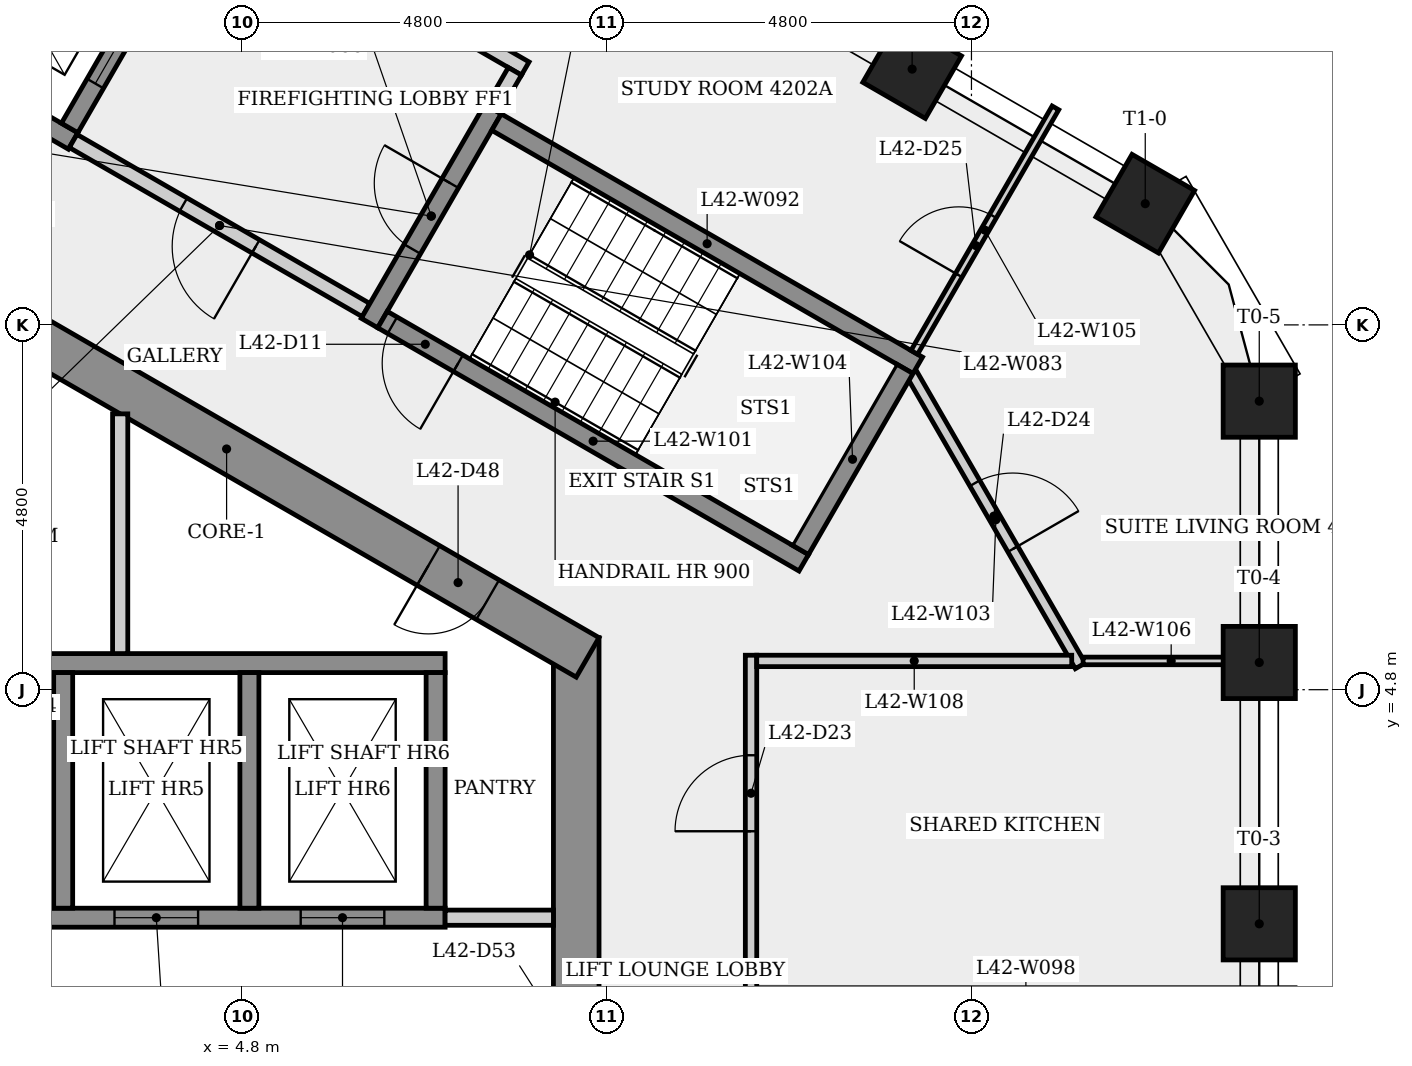
"""IFC4 building model, lengths in metres.
Left out: names, types, materials, properties, quantities, classifications, styles, units other than length and angle.
Written with IfcOpenShell. Run it as: python <this file> out.ifc"""

import sys

from ifc_helpers import new_model, si_unit, direction, frame, frame_2d, origin, origin_2d, place, context, subcontext, project, spatial, rectangle, extrude, element, fill, save


model = new_model("IFC4")
c1 = context("Model", 3, precision=1e-05, world=origin(), true_north=direction((0.0, 1.0)))
c2 = subcontext(c1, "Body", "Model", "MODEL_VIEW")
j1 = project(units=[si_unit("LENGTHUNIT", "METRE"), si_unit("PLANEANGLEUNIT", "RADIAN")], contexts=[c1])
p1 = place(None, origin())
s1 = spatial("IfcSite", under=j1, at=p1, CompositionType="ELEMENT")
p2 = place(p1, origin())
s2 = spatial("IfcBuilding", under=s1, at=p2, CompositionType="ELEMENT")
p3 = place(p2, frame((0.0, 0.0, 159.5)))
s3 = spatial("IfcBuildingStorey", under=s2, at=p3, CompositionType="ELEMENT", Elevation=159.5)
p4 = place(p3, frame((9.2, -5.485, 0.0), z_axis=(0.0, 0.0, 1.0), x_axis=(0.0, 1.0, 0.0)))
e1 = element("IfcWall", 1, at=p4, inside=s3, PredefinedType="SHEAR", context=c2, shape_type="SweptSolid", body=[
    extrude(rectangle(XDim=10.97, YDim=0.6, at=frame_2d((5.485, 0.0))), origin(), (0.0, 0.0, 1.0), 3.4),
])
p5 = place(p4, frame((4.685, 0.0, 0.0)))
e2 = element("IfcOpeningElement", 2, at=p5, cuts=e1, PredefinedType="OPENING", context=c2, shape_type="SweptSolid", body=[
    extrude(rectangle(XDim=1.6, YDim=2.1, at=frame_2d((0.8, 1.05))), frame((0.0, 0.31, 0.0), z_axis=(0.0, -1.0, 0.0), x_axis=(1.0, 0.0, 0.0)), (0.0, 0.0, 1.0), 0.62),
])
p6 = place(p3, frame((9.35, 5.225, 0.0), z_axis=(0.0, 0.0, 1.0), x_axis=(-0.866023993627, 0.500002442456, 0.0)))
e3 = element("IfcWall", 3, at=p6, inside=s3, PredefinedType="SHEAR", context=c2, shape_type="SweptSolid", body=[
    extrude(rectangle(XDim=10.97, YDim=0.6, at=frame_2d((5.485, 0.0))), origin(), (0.0, 0.0, 1.0), 3.4),
])
p7 = place(p6, frame((8.325, 0.0, 0.0)))
e4 = element("IfcOpeningElement", 4, at=p7, cuts=e3, PredefinedType="OPENING", context=c2, shape_type="SweptSolid", body=[
    extrude(rectangle(XDim=0.9, YDim=2.1, at=frame_2d((0.45, 1.05))), frame((0.0, 0.31, 0.0), z_axis=(0.0, -1.0, 0.0), x_axis=(1.0, 0.0, 0.0)), (0.0, 0.0, 1.0), 0.62),
])
p8 = place(p6, frame((1.518, 0.0, 0.0)))
e5 = element("IfcOpeningElement", 5, at=p8, cuts=e3, PredefinedType="OPENING", context=c2, shape_type="SweptSolid", body=[
    extrude(rectangle(XDim=0.9, YDim=2.1, at=frame_2d((0.45, 1.05))), frame((0.0, 0.31, 0.0), z_axis=(0.0, -1.0, 0.0), x_axis=(1.0, 0.0, 0.0)), (0.0, 0.0, 1.0), 0.62),
])
for number, where, z_axis, x_axis in (
    (6, (18.187, 1.719, 0.0), (0.0, 0.0, 1.0), (1.0, 0.0, 0.0)),
    (7, (18.187, 5.158, 0.0), (0.0, 0.0, 1.0), (1.0, 0.0, 0.0)),
    (8, (18.187, 8.597, 0.0), (0.0, 0.0, 1.0), (1.0, 0.0, 0.0)),
    (9, (16.687, 11.195, 0.0), (0.0, 0.0, 1.0), (0.5, 0.866, 0.0)),
    (10, (13.62, 12.965, 0.0), (0.0, 0.0, 1.0), (0.5, 0.866, 0.0)),
):
    element("IfcColumn", number, at=place(p3, frame(where, z_axis=z_axis, x_axis=x_axis)), inside=s3, PredefinedType="COLUMN", context=c2, shape_type="SweptSolid", body=[
        extrude(rectangle(XDim=0.95, YDim=0.95, at=origin_2d()), origin(), (0.0, 0.0, 1.0), 3.4),
    ])
p9 = place(p3, frame((-7.475, 1.8, 0.0), z_axis=(0.0, 0.0, 1.0), x_axis=(1.0, 0.0, 0.0)))
e11 = element("IfcWall", 11, at=p9, inside=s3, PredefinedType="SHEAR", context=c2, shape_type="SweptSolid", body=[
    extrude(rectangle(XDim=14.95, YDim=0.25, at=frame_2d((7.475, 0.0))), origin(), (0.0, 0.0, 1.0), 3.05),
])
p10 = place(p9, frame((0.8, 0.0, 0.0)))
e12 = element("IfcOpeningElement", 12, at=p10, cuts=e11, PredefinedType="OPENING", context=c2, shape_type="SweptSolid", body=[
    extrude(rectangle(XDim=1.1, YDim=2.1, at=frame_2d((0.55, 1.05))), frame((0.0, 0.135, 0.0), z_axis=(0.0, -1.0, 0.0), x_axis=(1.0, 0.0, 0.0)), (0.0, 0.0, 1.0), 0.27),
])
p11 = place(p9, frame((3.25, 0.0, 0.0)))
e13 = element("IfcOpeningElement", 13, at=p11, cuts=e11, PredefinedType="OPENING", context=c2, shape_type="SweptSolid", body=[
    extrude(rectangle(XDim=1.1, YDim=2.1, at=frame_2d((0.55, 1.05))), frame((0.0, 0.135, 0.0), z_axis=(0.0, -1.0, 0.0), x_axis=(1.0, 0.0, 0.0)), (0.0, 0.0, 1.0), 0.27),
])
p12 = place(p9, frame((5.7, 0.0, 0.0)))
e14 = element("IfcOpeningElement", 14, at=p12, cuts=e11, PredefinedType="OPENING", context=c2, shape_type="SweptSolid", body=[
    extrude(rectangle(XDim=1.1, YDim=2.1, at=frame_2d((0.55, 1.05))), frame((0.0, 0.135, 0.0), z_axis=(0.0, -1.0, 0.0), x_axis=(1.0, 0.0, 0.0)), (0.0, 0.0, 1.0), 0.27),
])
p13 = place(p9, frame((8.15, 0.0, 0.0)))
e15 = element("IfcOpeningElement", 15, at=p13, cuts=e11, PredefinedType="OPENING", context=c2, shape_type="SweptSolid", body=[
    extrude(rectangle(XDim=1.1, YDim=2.1, at=frame_2d((0.55, 1.05))), frame((0.0, 0.135, 0.0), z_axis=(0.0, -1.0, 0.0), x_axis=(1.0, 0.0, 0.0)), (0.0, 0.0, 1.0), 0.27),
])
p14 = place(p9, frame((10.6, 0.0, 0.0)))
e16 = element("IfcOpeningElement", 16, at=p14, cuts=e11, PredefinedType="OPENING", context=c2, shape_type="SweptSolid", body=[
    extrude(rectangle(XDim=1.1, YDim=2.1, at=frame_2d((0.55, 1.05))), frame((0.0, 0.135, 0.0), z_axis=(0.0, -1.0, 0.0), x_axis=(1.0, 0.0, 0.0)), (0.0, 0.0, 1.0), 0.27),
])
p15 = place(p9, frame((13.05, 0.0, 0.0)))
e17 = element("IfcOpeningElement", 17, at=p15, cuts=e11, PredefinedType="OPENING", context=c2, shape_type="SweptSolid", body=[
    extrude(rectangle(XDim=1.1, YDim=2.1, at=frame_2d((0.55, 1.05))), frame((0.0, 0.135, 0.0), z_axis=(0.0, -1.0, 0.0), x_axis=(1.0, 0.0, 0.0)), (0.0, 0.0, 1.0), 0.27),
])
p16 = place(p3, frame((-7.225, 5.15, 0.0), z_axis=(0.0, 0.0, 1.0), x_axis=(1.0, 0.0, 0.0)))
e18 = element("IfcWall", 18, at=p16, inside=s3, PredefinedType="SHEAR", context=c2, shape_type="SweptSolid", body=[
    extrude(rectangle(XDim=14.7, YDim=0.25, at=frame_2d((7.35, 0.0))), origin(), (0.0, 0.0, 1.0), 3.05),
])
p17 = place(p3, frame((2.45, 5.025, 0.0), z_axis=(0.0, 0.0, 1.0), x_axis=(0.0, -1.0, 0.0)))
e19 = element("IfcWall", 19, at=p17, inside=s3, PredefinedType="SHEAR", context=c2, shape_type="SweptSolid", body=[
    extrude(rectangle(XDim=3.1, YDim=0.25, at=frame_2d((1.55, 0.0))), origin(), (0.0, 0.0, 1.0), 3.4),
])
p18 = place(p3, frame((2.581, 12.02, 0.0), z_axis=(0.0, 0.0, 1.0), x_axis=(-0.866040211805, 0.499974350878, 0.0)))
e20 = element("IfcWall", 20, at=p18, inside=s3, PredefinedType="SHEAR", context=c2, shape_type="SweptSolid", body=[
    extrude(rectangle(XDim=3.3, YDim=0.25, at=frame_2d((1.65, 0.0))), origin(), (0.0, 0.0, 1.0), 3.05),
])
p19 = place(p3, frame((2.535, 12.191, 0.0), z_axis=(0.0, 0.0, 1.0), x_axis=(0.500061746146, 0.865989751695, 0.0)))
e21 = element("IfcWall", 21, at=p19, inside=s3, PredefinedType="SHEAR", context=c2, shape_type="SweptSolid", body=[
    extrude(rectangle(XDim=2.45, YDim=0.25, at=frame_2d((1.225, 0.0))), origin(), (0.0, 0.0, 1.0), 3.4),
])
p20 = place(p19, frame((0.675, 0.0, 0.0)))
e22 = element("IfcOpeningElement", 22, at=p20, cuts=e21, PredefinedType="OPENING", context=c2, shape_type="SweptSolid", body=[
    extrude(rectangle(XDim=1.1, YDim=2.1, at=frame_2d((0.55, 1.05))), frame((0.0, 0.135, 0.0), z_axis=(0.0, -1.0, 0.0), x_axis=(1.0, 0.0, 0.0)), (0.0, 0.0, 1.0), 0.27),
])
p21 = place(p3, frame((3.2, 8.429, 0.0), z_axis=(0.0, 0.0, 1.0), x_axis=(0.0, -1.0, 0.0)))
e23 = element("IfcWall", 23, at=p21, inside=s3, PredefinedType="PARTITIONING", context=c2, shape_type="SweptSolid", body=[
    extrude(rectangle(XDim=3.154, YDim=0.2, at=frame_2d((1.577, 0.0))), origin(), (0.0, 0.0, 1.0), 3.05),
])
p22 = place(p3, frame((4.459, 15.323, 0.0), z_axis=(0.0, 0.0, 1.0), x_axis=(0.866016039709, -0.500016218704, 0.0)))
e24 = element("IfcWall", 24, at=p22, inside=s3, PredefinedType="PARTITIONING", context=c2, shape_type="SweptSolid", body=[
    extrude(rectangle(XDim=4.7, YDim=0.2, at=frame_2d((2.35, 0.0))), origin(), (0.0, 0.0, 1.0), 3.05),
])
p23 = place(p3, frame((4.9, 5.025, 0.0), z_axis=(0.0, 0.0, 1.0), x_axis=(0.0, -1.0, 0.0)))
e25 = element("IfcWall", 25, at=p23, inside=s3, PredefinedType="SHEAR", context=c2, shape_type="SweptSolid", body=[
    extrude(rectangle(XDim=3.1, YDim=0.25, at=frame_2d((1.55, 0.0))), origin(), (0.0, 0.0, 1.0), 3.4),
])
p24 = place(p3, frame((6.435, 9.795, 0.0), z_axis=(0.0, 0.0, 1.0), x_axis=(-0.866012907634, 0.500021643343, 0.0)))
e26 = element("IfcWall", 26, at=p24, inside=s3, PredefinedType="PARTITIONING", context=c2, shape_type="SweptSolid", body=[
    extrude(rectangle(XDim=4.45, YDim=0.2, at=frame_2d((2.225, 0.0))), origin(), (0.0, 0.0, 1.0), 3.05),
])
p25 = place(p24, frame((1.675, 0.0, 0.0)))
e27 = element("IfcOpeningElement", 27, at=p25, cuts=e26, PredefinedType="OPENING", context=c2, shape_type="SweptSolid", body=[
    extrude(rectangle(XDim=1.1, YDim=2.1, at=frame_2d((0.55, 1.05))), frame((0.0, 0.11, 0.0), z_axis=(0.0, -1.0, 0.0), x_axis=(1.0, 0.0, 0.0)), (0.0, 0.0, 1.0), 0.22),
])
p26 = place(p3, frame((6.48, 9.624, 0.0), z_axis=(0.0, 0.0, 1.0), x_axis=(0.500017246033, 0.866015446554, 0.0)))
e28 = element("IfcWall", 28, at=p26, inside=s3, PredefinedType="SHEAR", context=c2, shape_type="SweptSolid", body=[
    extrude(rectangle(XDim=3.25, YDim=0.25, at=frame_2d((1.625, 0.0))), origin(), (0.0, 0.0, 1.0), 3.05),
])
p27 = place(p26, frame((1.125, 0.0, 0.0)))
e29 = element("IfcOpeningElement", 29, at=p27, cuts=e28, PredefinedType="OPENING", context=c2, shape_type="SweptSolid", body=[
    extrude(rectangle(XDim=1.0, YDim=2.1, at=frame_2d((0.5, 1.05))), frame((0.0, 0.135, 0.0), z_axis=(0.0, -1.0, 0.0), x_axis=(1.0, 0.0, 0.0)), (0.0, 0.0, 1.0), 0.27),
])
p28 = place(p3, frame((7.475, 1.8, 0.0), z_axis=(0.0, 0.0, 1.0), x_axis=(1.0, 0.0, 0.0)))
e30 = element("IfcWall", 30, at=p28, inside=s3, PredefinedType="PARTITIONING", context=c2, shape_type="SweptSolid", body=[
    extrude(rectangle(XDim=1.425, YDim=0.2, at=frame_2d((0.712, 0.0))), origin(), (0.0, 0.0, 1.0), 3.05),
])
p29 = place(p3, frame((7.35, 5.025, 0.0), z_axis=(0.0, 0.0, 1.0), x_axis=(0.0, -1.0, 0.0)))
e31 = element("IfcWall", 31, at=p29, inside=s3, PredefinedType="SHEAR", context=c2, shape_type="SweptSolid", body=[
    extrude(rectangle(XDim=3.1, YDim=0.25, at=frame_2d((1.55, 0.0))), origin(), (0.0, 0.0, 1.0), 3.4),
])
p30 = place(p3, frame((8.151, 12.268, 0.0), z_axis=(0.0, 0.0, 1.0), x_axis=(0.866025499775, -0.499999833739, 0.0)))
e32 = element("IfcWall", 32, at=p30, inside=s3, PredefinedType="SHEAR", context=c2, shape_type="SweptSolid", body=[
    extrude(rectangle(XDim=6.4, YDim=0.25, at=frame_2d((3.2, 0.0))), origin(), (0.0, 0.0, 1.0), 3.05),
])
p31 = place(p3, frame((8.393, 12.937, 0.0), z_axis=(0.0, 0.0, 1.0), x_axis=(-0.500065409566, -0.86598763626, 0.0)))
e33 = element("IfcWall", 33, at=p31, inside=s3, PredefinedType="PARTITIONING", context=c2, shape_type="SweptSolid", body=[
    extrude(rectangle(XDim=0.575, YDim=0.2, at=frame_2d((0.288, 0.0))), origin(), (0.0, 0.0, 1.0), 3.05),
])
p32 = place(p3, frame((11.5, -5.104, 0.0), z_axis=(0.0, 0.0, 1.0), x_axis=(0.0, 1.0, 0.0)))
e34 = element("IfcWall", 34, at=p32, inside=s3, PredefinedType="PARTITIONING", context=c2, shape_type="SweptSolid", body=[
    extrude(rectangle(XDim=10.357, YDim=0.15, at=frame_2d((5.178, 0.0))), origin(), (0.0, 0.0, 1.0), 3.05),
])
p33 = place(p32, frame((2.451, 0.0, 0.0)))
e35 = element("IfcOpeningElement", 35, at=p33, cuts=e34, PredefinedType="OPENING", context=c2, shape_type="SweptSolid", body=[
    extrude(rectangle(XDim=1.0, YDim=2.1, at=frame_2d((0.5, 1.05))), frame((0.0, 0.085, 0.0), z_axis=(0.0, -1.0, 0.0), x_axis=(1.0, 0.0, 0.0)), (0.0, 0.0, 1.0), 0.17),
])
p34 = place(p32, frame((8.041, 0.0, 0.0)))
e36 = element("IfcOpeningElement", 36, at=p34, cuts=e34, PredefinedType="OPENING", context=c2, shape_type="SweptSolid", body=[
    extrude(rectangle(XDim=1.0, YDim=2.1, at=frame_2d((0.5, 1.05))), frame((0.0, 0.085, 0.0), z_axis=(0.0, -1.0, 0.0), x_axis=(1.0, 0.0, 0.0)), (0.0, 0.0, 1.0), 0.17),
])
p35 = place(p3, frame((12.194, 6.47, 0.0), z_axis=(0.0, 0.0, 1.0), x_axis=(-0.866025499775, 0.499999833739, 0.0)))
e37 = element("IfcWall", 37, at=p35, inside=s3, PredefinedType="SHEAR", context=c2, shape_type="SweptSolid", body=[
    extrude(rectangle(XDim=6.4, YDim=0.25, at=frame_2d((3.2, 0.0))), origin(), (0.0, 0.0, 1.0), 3.05),
])
p36 = place(p35, frame((5.25, 0.0, 0.0)))
e38 = element("IfcOpeningElement", 38, at=p36, cuts=e37, PredefinedType="OPENING", context=c2, shape_type="SweptSolid", body=[
    extrude(rectangle(XDim=1.0, YDim=2.1, at=frame_2d((0.5, 1.05))), frame((0.0, 0.135, 0.0), z_axis=(0.0, -1.0, 0.0), x_axis=(1.0, 0.0, 0.0)), (0.0, 0.0, 1.0), 0.27),
])
p37 = place(p3, frame((13.611, 8.959, 0.0), z_axis=(0.0, 0.0, 1.0), x_axis=(0.50000642917, -0.866021691869, 0.0)))
e39 = element("IfcWall", 39, at=p37, inside=s3, PredefinedType="PARTITIONING", context=c2, shape_type="SweptSolid", body=[
    extrude(rectangle(XDim=4.44, YDim=0.15, at=frame_2d((2.22, 0.0))), origin(), (0.0, 0.0, 1.0), 3.05),
])
p38 = place(p37, frame((1.665, 0.0, 0.0)))
e40 = element("IfcOpeningElement", 40, at=p38, cuts=e39, PredefinedType="OPENING", context=c2, shape_type="SweptSolid", body=[
    extrude(rectangle(XDim=1.0, YDim=2.1, at=frame_2d((0.5, 1.05))), frame((0.0, 0.085, 0.0), z_axis=(0.0, -1.0, 0.0), x_axis=(1.0, 0.0, 0.0)), (0.0, 0.0, 1.0), 0.17),
])
p39 = place(p3, frame((12.148, 6.641, 0.0), z_axis=(0.0, 0.0, 1.0), x_axis=(0.500034990121, 0.866005201286, 0.0)))
e41 = element("IfcWall", 41, at=p39, inside=s3, PredefinedType="SHEAR", context=c2, shape_type="SweptSolid", body=[
    extrude(rectangle(XDim=2.75, YDim=0.25, at=frame_2d((1.375, 0.0))), origin(), (0.0, 0.0, 1.0), 3.05),
])
p40 = place(p3, frame((13.648, 9.239, 0.0), z_axis=(0.0, 0.0, 1.0), x_axis=(0.500048687089, 0.865997292456, 0.0)))
e42 = element("IfcWall", 42, at=p40, inside=s3, PredefinedType="PARTITIONING", context=c2, shape_type="SweptSolid", body=[
    extrude(rectangle(XDim=3.714, YDim=0.1, at=frame_2d((1.857, 0.0))), origin(), (0.0, 0.0, 1.0), 3.05),
])
p41 = place(p40, frame((1.171, 0.0, 0.0)))
e43 = element("IfcOpeningElement", 43, at=p41, cuts=e42, PredefinedType="OPENING", context=c2, shape_type="SweptSolid", body=[
    extrude(rectangle(XDim=0.9, YDim=2.1, at=frame_2d((0.45, 1.05))), frame((0.0, 0.06, 0.0), z_axis=(0.0, -1.0, 0.0), x_axis=(1.0, 0.0, 0.0)), (0.0, 0.0, 1.0), 0.12),
])
p42 = place(p3, frame((15.869, 5.178, 0.0), z_axis=(0.0, 0.0, 1.0), x_axis=(1.0, 0.0, 0.0)))
e44 = element("IfcWall", 44, at=p42, inside=s3, PredefinedType="PARTITIONING", context=c2, shape_type="SweptSolid", body=[
    extrude(rectangle(XDim=2.318, YDim=0.1, at=frame_2d((1.159, 0.0))), origin(), (0.0, 0.0, 1.0), 3.05),
])
p43 = place(p3, frame((15.719, 5.178, 0.0), z_axis=(0.0, 0.0, 1.0), x_axis=(-1.0, 0.0, 0.0)))
e45 = element("IfcWall", 45, at=p43, inside=s3, PredefinedType="PARTITIONING", context=c2, shape_type="SweptSolid", body=[
    extrude(rectangle(XDim=4.144, YDim=0.15, at=frame_2d((2.072, 0.0))), origin(), (0.0, 0.0, 1.0), 3.05),
])
p44 = place(p14, origin())
e46 = element("IfcDoor", 46, at=p44, inside=s3, OperationType="SLIDING_TO_LEFT", PredefinedType="DOOR", context=c2, shape_type="SweptSolid", body=[
    extrude(rectangle(XDim=1.1, YDim=2.1, at=frame_2d((0.55, 1.05))), frame((0.0, 0.025, 0.0), z_axis=(0.0, -1.0, 0.0), x_axis=(1.0, 0.0, 0.0)), (0.0, 0.0, 1.0), 0.05),
])
fill(e16, e46)
p45 = place(p15, origin())
e47 = element("IfcDoor", 47, at=p45, inside=s3, OperationType="SLIDING_TO_LEFT", PredefinedType="DOOR", context=c2, shape_type="SweptSolid", body=[
    extrude(rectangle(XDim=1.1, YDim=2.1, at=frame_2d((0.55, 1.05))), frame((0.0, 0.025, 0.0), z_axis=(0.0, -1.0, 0.0), x_axis=(1.0, 0.0, 0.0)), (0.0, 0.0, 1.0), 0.05),
])
fill(e17, e47)
p46 = place(p36, origin())
e48 = element("IfcDoor", 48, at=p46, inside=s3, OperationType="SINGLE_SWING_LEFT", PredefinedType="DOOR", context=c2, shape_type="SweptSolid", body=[
    extrude(rectangle(XDim=1.0, YDim=2.1, at=frame_2d((0.5, 1.05))), frame((0.0, 0.025, 0.0), z_axis=(0.0, -1.0, 0.0), x_axis=(1.0, 0.0, 0.0)), (0.0, 0.0, 1.0), 0.05),
])
fill(e38, e48)
p47 = place(p27, origin())
e49 = element("IfcDoor", 49, at=p47, inside=s3, OperationType="SINGLE_SWING_RIGHT", PredefinedType="DOOR", context=c2, shape_type="SweptSolid", body=[
    extrude(rectangle(XDim=1.0, YDim=2.1, at=frame_2d((0.5, 1.05))), frame((0.0, 0.025, 0.0), z_axis=(0.0, -1.0, 0.0), x_axis=(1.0, 0.0, 0.0)), (0.0, 0.0, 1.0), 0.05),
])
fill(e29, e49)
p48 = place(p25, origin())
e50 = element("IfcDoor", 50, at=p48, inside=s3, OperationType="SINGLE_SWING_LEFT", PredefinedType="DOOR", context=c2, shape_type="SweptSolid", body=[
    extrude(rectangle(XDim=1.1, YDim=2.1, at=frame_2d((0.55, 1.05))), frame((0.0, 0.025, 0.0), z_axis=(0.0, -1.0, 0.0), x_axis=(1.0, 0.0, 0.0)), (0.0, 0.0, 1.0), 0.05),
])
fill(e27, e50)
p49 = place(p20, origin())
e51 = element("IfcDoor", 51, at=p49, inside=s3, OperationType="SLIDING_TO_LEFT", PredefinedType="DOOR", context=c2, shape_type="SweptSolid", body=[
    extrude(rectangle(XDim=1.1, YDim=2.1, at=frame_2d((0.55, 1.05))), frame((0.0, 0.025, 0.0), z_axis=(0.0, -1.0, 0.0), x_axis=(1.0, 0.0, 0.0)), (0.0, 0.0, 1.0), 0.05),
])
fill(e22, e51)
p50 = place(p34, origin())
e52 = element("IfcDoor", 52, at=p50, inside=s3, OperationType="SINGLE_SWING_LEFT", PredefinedType="DOOR", context=c2, shape_type="SweptSolid", body=[
    extrude(rectangle(XDim=1.0, YDim=2.1, at=frame_2d((0.5, 1.05))), frame((0.0, 0.025, 0.0), z_axis=(0.0, -1.0, 0.0), x_axis=(1.0, 0.0, 0.0)), (0.0, 0.0, 1.0), 0.05),
])
fill(e36, e52)
p51 = place(p38, origin())
e53 = element("IfcDoor", 53, at=p51, inside=s3, OperationType="SINGLE_SWING_RIGHT", PredefinedType="DOOR", context=c2, shape_type="SweptSolid", body=[
    extrude(rectangle(XDim=1.0, YDim=2.1, at=frame_2d((0.5, 1.05))), frame((0.0, 0.025, 0.0), z_axis=(0.0, -1.0, 0.0), x_axis=(1.0, 0.0, 0.0)), (0.0, 0.0, 1.0), 0.05),
])
fill(e40, e53)
p52 = place(p41, origin())
e54 = element("IfcDoor", 54, at=p52, inside=s3, OperationType="SINGLE_SWING_LEFT", PredefinedType="DOOR", context=c2, shape_type="SweptSolid", body=[
    extrude(rectangle(XDim=0.9, YDim=2.1, at=frame_2d((0.45, 1.05))), frame((0.0, 0.025, 0.0), z_axis=(0.0, -1.0, 0.0), x_axis=(1.0, 0.0, 0.0)), (0.0, 0.0, 1.0), 0.05),
])
fill(e43, e54)
p53 = place(p8, origin())
e55 = element("IfcDoor", 55, at=p53, inside=s3, OperationType="SINGLE_SWING_RIGHT", PredefinedType="DOOR", context=c2, shape_type="SweptSolid", body=[
    extrude(rectangle(XDim=0.9, YDim=2.1, at=frame_2d((0.45, 1.05))), frame((0.0, 0.025, 0.0), z_axis=(0.0, -1.0, 0.0), x_axis=(1.0, 0.0, 0.0)), (0.0, 0.0, 1.0), 0.05),
])
fill(e5, e55)
save(model, sys.argv[1])
